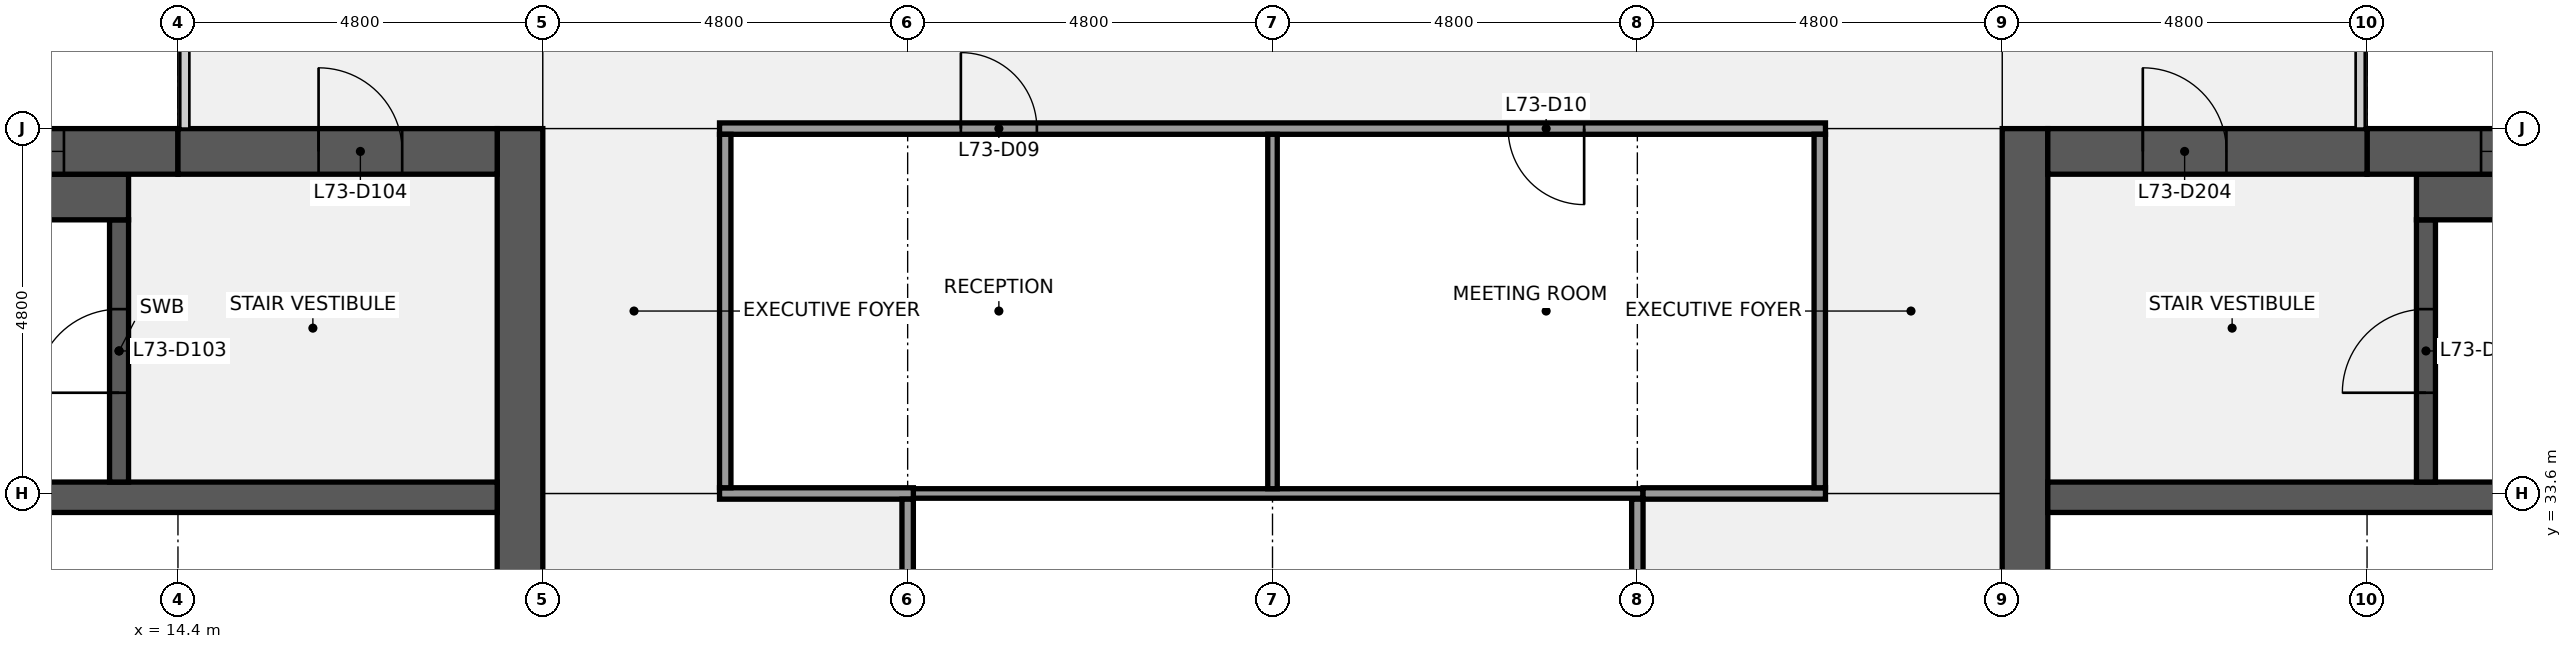
"""IFC4 building model, lengths in metres.
Left out: names, types, materials, properties, quantities, classifications, styles, units other than length and angle.
Written with IfcOpenShell. Run it as: python <this file> out.ifc"""

import sys

from ifc_helpers import new_model, si_unit, direction, frame, frame_2d, origin, place, context, subcontext, project, spatial, rectangle, extrude, element, fill, save


model = new_model("IFC4")
c1 = context("Model", 3, precision=1e-05, world=origin(), true_north=direction((0.0, 1.0)))
c2 = subcontext(c1, "Body", "Model", "MODEL_VIEW")
j1 = project(units=[si_unit("LENGTHUNIT", "METRE"), si_unit("PLANEANGLEUNIT", "RADIAN")], contexts=[c1])
p1 = place(None, origin())
s1 = spatial("IfcSite", under=j1, at=p1, CompositionType="ELEMENT")
p2 = place(p1, origin())
s2 = spatial("IfcBuilding", under=s1, at=p2, CompositionType="ELEMENT")
p3 = place(p2, frame((0.0, 0.0, 330.3)))
s3 = spatial("IfcBuildingStorey", under=s2, at=p3, CompositionType="ELEMENT", Elevation=330.3)
p4 = place(p3, frame((18.9, 38.4, 0.0), z_axis=(0.0, 0.0, 1.0), x_axis=(0.0, -1.0, 0.0)))
e1 = element("IfcWall", 1, at=p4, inside=s3, PredefinedType="SHEAR", context=c2, shape_type="SweptSolid", body=[
    extrude(rectangle(XDim=28.8, YDim=0.6, at=frame_2d((14.4, 0.0))), origin(), (0.0, 0.0, 1.0), 3.84),
])
p5 = place(p4, frame((18.3, 0.0, 0.0)))
e2 = element("IfcOpeningElement", 2, at=p5, cuts=e1, PredefinedType="OPENING", context=c2, shape_type="SweptSolid", body=[
    extrude(rectangle(XDim=1.8, YDim=2.1, at=frame_2d((0.9, 1.05))), frame((0.0, 0.31, 0.0), z_axis=(0.0, -1.0, 0.0), x_axis=(1.0, 0.0, 0.0)), (0.0, 0.0, 1.0), 0.62),
])
p6 = place(p4, frame((8.7, 0.0, 0.0)))
e3 = element("IfcOpeningElement", 3, at=p6, cuts=e1, PredefinedType="OPENING", context=c2, shape_type="SweptSolid", body=[
    extrude(rectangle(XDim=1.8, YDim=2.1, at=frame_2d((0.9, 1.05))), frame((0.0, 0.31, 0.0), z_axis=(0.0, -1.0, 0.0), x_axis=(1.0, 0.0, 0.0)), (0.0, 0.0, 1.0), 0.62),
])
p7 = place(p3, frame((0.6, 33.55, 0.0), z_axis=(0.0, 0.0, 1.0), x_axis=(1.0, 0.0, 0.0)))
e4 = element("IfcWall", 4, at=p7, inside=s3, PredefinedType="SHEAR", context=c2, shape_type="SweptSolid", body=[
    extrude(rectangle(XDim=18.0, YDim=0.4, at=frame_2d((9.0, 0.0))), origin(), (0.0, 0.0, 1.0), 3.84),
])
p8 = place(p3, frame((13.625, 33.75, 0.0), z_axis=(0.0, 0.0, 1.0), x_axis=(0.0, 1.0, 0.0)))
e5 = element("IfcWall", 5, at=p8, inside=s3, PredefinedType="SHEAR", context=c2, shape_type="SweptSolid", body=[
    extrude(rectangle(XDim=3.45, YDim=0.25, at=frame_2d((1.725, 0.0))), origin(), (0.0, 0.0, 1.0), 3.84),
])
p9 = place(p8, frame((1.175, 0.0, 0.0)))
e6 = element("IfcOpeningElement", 6, at=p9, cuts=e5, PredefinedType="OPENING", context=c2, shape_type="SweptSolid", body=[
    extrude(rectangle(XDim=1.1, YDim=2.1, at=frame_2d((0.55, 1.05))), frame((0.0, 0.135, 0.0), z_axis=(0.0, -1.0, 0.0), x_axis=(1.0, 0.0, 0.0)), (0.0, 0.0, 1.0), 0.27),
])
p10 = place(p3, frame((6.25, 37.5, 0.0), z_axis=(0.0, 0.0, 1.0), x_axis=(1.0, 0.0, 0.0)))
e7 = element("IfcWall", 7, at=p10, inside=s3, PredefinedType="SHEAR", context=c2, shape_type="SweptSolid", body=[
    extrude(rectangle(XDim=7.5, YDim=0.6, at=frame_2d((3.75, 0.0))), origin(), (0.0, 0.0, 1.0), 3.84),
])
p11 = place(p3, frame((0.6, 38.1, 0.0), z_axis=(0.0, 0.0, 1.0), x_axis=(1.0, 0.0, 0.0)))
e8 = element("IfcWall", 8, at=p11, inside=s3, PredefinedType="SHEAR", context=c2, shape_type="SweptSolid", body=[
    extrude(rectangle(XDim=13.8, YDim=0.6, at=frame_2d((6.9, 0.0))), origin(), (0.0, 0.0, 1.0), 3.84),
])
p12 = place(p11, frame((5.7, 0.0, 0.9)))
e9 = element("IfcOpeningElement", 9, at=p12, cuts=e8, PredefinedType="OPENING", context=c2, shape_type="SweptSolid", body=[
    extrude(rectangle(XDim=1.8, YDim=1.5, at=frame_2d((0.9, 0.75))), frame((0.0, 0.31, 0.0), z_axis=(0.0, -1.0, 0.0), x_axis=(1.0, 0.0, 0.0)), (0.0, 0.0, 1.0), 0.62),
])
p13 = place(p11, frame((10.5, 0.0, 0.9)))
e10 = element("IfcOpeningElement", 10, at=p13, cuts=e8, PredefinedType="OPENING", context=c2, shape_type="SweptSolid", body=[
    extrude(rectangle(XDim=1.8, YDim=1.5, at=frame_2d((0.9, 0.75))), frame((0.0, 0.31, 0.0), z_axis=(0.0, -1.0, 0.0), x_axis=(1.0, 0.0, 0.0)), (0.0, 0.0, 1.0), 0.62),
])
p14 = place(p3, frame((14.4, 38.1, 0.0), z_axis=(0.0, 0.0, 1.0), x_axis=(1.0, 0.0, 0.0)))
e11 = element("IfcWall", 11, at=p14, inside=s3, PredefinedType="SHEAR", context=c2, shape_type="SweptSolid", body=[
    extrude(rectangle(XDim=4.2, YDim=0.6, at=frame_2d((2.1, 0.0))), origin(), (0.0, 0.0, 1.0), 3.84),
])
p15 = place(p14, frame((1.85, 0.0, 0.0)))
e12 = element("IfcOpeningElement", 12, at=p15, cuts=e11, PredefinedType="OPENING", context=c2, shape_type="SweptSolid", body=[
    extrude(rectangle(XDim=1.1, YDim=2.1, at=frame_2d((0.55, 1.05))), frame((0.0, 0.31, 0.0), z_axis=(0.0, -1.0, 0.0), x_axis=(1.0, 0.0, 0.0)), (0.0, 0.0, 1.0), 0.62),
])
p16 = place(p3, frame((38.7, 9.6, 0.0), z_axis=(0.0, 0.0, 1.0), x_axis=(0.0, 1.0, 0.0)))
e13 = element("IfcWall", 13, at=p16, inside=s3, PredefinedType="SHEAR", context=c2, shape_type="SweptSolid", body=[
    extrude(rectangle(XDim=28.8, YDim=0.6, at=frame_2d((14.4, 0.0))), origin(), (0.0, 0.0, 1.0), 3.84),
])
p17 = place(p16, frame((8.7, 0.0, 0.0)))
e14 = element("IfcOpeningElement", 14, at=p17, cuts=e13, PredefinedType="OPENING", context=c2, shape_type="SweptSolid", body=[
    extrude(rectangle(XDim=1.8, YDim=2.1, at=frame_2d((0.9, 1.05))), frame((0.0, 0.31, 0.0), z_axis=(0.0, -1.0, 0.0), x_axis=(1.0, 0.0, 0.0)), (0.0, 0.0, 1.0), 0.62),
])
p18 = place(p16, frame((18.3, 0.0, 0.0)))
e15 = element("IfcOpeningElement", 15, at=p18, cuts=e13, PredefinedType="OPENING", context=c2, shape_type="SweptSolid", body=[
    extrude(rectangle(XDim=1.8, YDim=2.1, at=frame_2d((0.9, 1.05))), frame((0.0, 0.31, 0.0), z_axis=(0.0, -1.0, 0.0), x_axis=(1.0, 0.0, 0.0)), (0.0, 0.0, 1.0), 0.62),
])
p19 = place(p3, frame((39.0, 33.55, 0.0), z_axis=(0.0, 0.0, 1.0), x_axis=(1.0, 0.0, 0.0)))
e16 = element("IfcWall", 16, at=p19, inside=s3, PredefinedType="SHEAR", context=c2, shape_type="SweptSolid", body=[
    extrude(rectangle(XDim=18.0, YDim=0.4, at=frame_2d((9.0, 0.0))), origin(), (0.0, 0.0, 1.0), 3.84),
])
p20 = place(p3, frame((43.975, 33.75, 0.0), z_axis=(0.0, 0.0, 1.0), x_axis=(0.0, 1.0, 0.0)))
e17 = element("IfcWall", 17, at=p20, inside=s3, PredefinedType="SHEAR", context=c2, shape_type="SweptSolid", body=[
    extrude(rectangle(XDim=3.45, YDim=0.25, at=frame_2d((1.725, 0.0))), origin(), (0.0, 0.0, 1.0), 3.84),
])
p21 = place(p20, frame((1.175, 0.0, 0.0)))
e18 = element("IfcOpeningElement", 18, at=p21, cuts=e17, PredefinedType="OPENING", context=c2, shape_type="SweptSolid", body=[
    extrude(rectangle(XDim=1.1, YDim=2.1, at=frame_2d((0.55, 1.05))), frame((0.0, 0.135, 0.0), z_axis=(0.0, -1.0, 0.0), x_axis=(1.0, 0.0, 0.0)), (0.0, 0.0, 1.0), 0.27),
])
p22 = place(p3, frame((43.85, 37.5, 0.0), z_axis=(0.0, 0.0, 1.0), x_axis=(1.0, 0.0, 0.0)))
e19 = element("IfcWall", 19, at=p22, inside=s3, PredefinedType="SHEAR", context=c2, shape_type="SweptSolid", body=[
    extrude(rectangle(XDim=7.5, YDim=0.6, at=frame_2d((3.75, 0.0))), origin(), (0.0, 0.0, 1.0), 3.84),
])
p23 = place(p3, frame((43.2, 38.1, 0.0), z_axis=(0.0, 0.0, 1.0), x_axis=(1.0, 0.0, 0.0)))
e20 = element("IfcWall", 20, at=p23, inside=s3, PredefinedType="SHEAR", context=c2, shape_type="SweptSolid", body=[
    extrude(rectangle(XDim=13.8, YDim=0.6, at=frame_2d((6.9, 0.0))), origin(), (0.0, 0.0, 1.0), 3.84),
])
p24 = place(p23, frame((6.3, 0.0, 0.9)))
e21 = element("IfcOpeningElement", 21, at=p24, cuts=e20, PredefinedType="OPENING", context=c2, shape_type="SweptSolid", body=[
    extrude(rectangle(XDim=1.8, YDim=1.5, at=frame_2d((0.9, 0.75))), frame((0.0, 0.31, 0.0), z_axis=(0.0, -1.0, 0.0), x_axis=(1.0, 0.0, 0.0)), (0.0, 0.0, 1.0), 0.62),
])
p25 = place(p23, frame((1.5, 0.0, 0.9)))
e22 = element("IfcOpeningElement", 22, at=p25, cuts=e20, PredefinedType="OPENING", context=c2, shape_type="SweptSolid", body=[
    extrude(rectangle(XDim=1.8, YDim=1.5, at=frame_2d((0.9, 0.75))), frame((0.0, 0.31, 0.0), z_axis=(0.0, -1.0, 0.0), x_axis=(1.0, 0.0, 0.0)), (0.0, 0.0, 1.0), 0.62),
])
p26 = place(p3, frame((39.0, 38.1, 0.0), z_axis=(0.0, 0.0, 1.0), x_axis=(1.0, 0.0, 0.0)))
e23 = element("IfcWall", 23, at=p26, inside=s3, PredefinedType="SHEAR", context=c2, shape_type="SweptSolid", body=[
    extrude(rectangle(XDim=4.2, YDim=0.6, at=frame_2d((2.1, 0.0))), origin(), (0.0, 0.0, 1.0), 3.84),
])
p27 = place(p26, frame((1.25, 0.0, 0.0)))
e24 = element("IfcOpeningElement", 24, at=p27, cuts=e23, PredefinedType="OPENING", context=c2, shape_type="SweptSolid", body=[
    extrude(rectangle(XDim=1.1, YDim=2.1, at=frame_2d((0.55, 1.05))), frame((0.0, 0.31, 0.0), z_axis=(0.0, -1.0, 0.0), x_axis=(1.0, 0.0, 0.0)), (0.0, 0.0, 1.0), 0.62),
])
p28 = place(p3, frame((24.075, 33.6, 0.0), z_axis=(0.0, 0.0, 1.0), x_axis=(1.0, 0.0, 0.0)))
e25 = element("IfcWall", 25, at=p28, inside=s3, PredefinedType="PARTITIONING", context=c2, shape_type="SweptSolid", body=[
    extrude(rectangle(XDim=9.6, YDim=0.125, at=frame_2d((4.8, 0.0))), origin(), (0.0, 0.0, 1.0), 2.87),
])
p29 = place(p3, frame((21.525, 33.6, 0.0), z_axis=(0.0, 0.0, 1.0), x_axis=(1.0, 0.0, 0.0)))
e26 = element("IfcWall", 26, at=p29, inside=s3, PredefinedType="PARTITIONING", context=c2, shape_type="SweptSolid", body=[
    extrude(rectangle(XDim=2.55, YDim=0.15, at=frame_2d((1.275, 0.0))), origin(), (0.0, 0.0, 1.0), 2.87),
])
p30 = place(p3, frame((33.675, 33.6, 0.0), z_axis=(0.0, 0.0, 1.0), x_axis=(1.0, 0.0, 0.0)))
e27 = element("IfcWall", 27, at=p30, inside=s3, PredefinedType="PARTITIONING", context=c2, shape_type="SweptSolid", body=[
    extrude(rectangle(XDim=2.4, YDim=0.15, at=frame_2d((1.2, 0.0))), origin(), (0.0, 0.0, 1.0), 2.87),
])
p31 = place(p3, frame((21.525, 38.4, 0.0), z_axis=(0.0, 0.0, 1.0), x_axis=(1.0, 0.0, 0.0)))
e28 = element("IfcWall", 28, at=p31, inside=s3, PredefinedType="PARTITIONING", context=c2, shape_type="SweptSolid", body=[
    extrude(rectangle(XDim=14.55, YDim=0.15, at=frame_2d((7.275, 0.0))), origin(), (0.0, 0.0, 1.0), 2.87),
])
p32 = place(p31, frame((3.175, 0.0, 0.0)))
e29 = element("IfcOpeningElement", 29, at=p32, cuts=e28, PredefinedType="OPENING", context=c2, shape_type="SweptSolid", body=[
    extrude(rectangle(XDim=1.0, YDim=2.1, at=frame_2d((0.5, 1.05))), frame((0.0, 0.085, 0.0), z_axis=(0.0, -1.0, 0.0), x_axis=(1.0, 0.0, 0.0)), (0.0, 0.0, 1.0), 0.17),
])
p33 = place(p31, frame((10.375, 0.0, 0.0)))
e30 = element("IfcOpeningElement", 30, at=p33, cuts=e28, PredefinedType="OPENING", context=c2, shape_type="SweptSolid", body=[
    extrude(rectangle(XDim=1.0, YDim=2.1, at=frame_2d((0.5, 1.05))), frame((0.0, 0.085, 0.0), z_axis=(0.0, -1.0, 0.0), x_axis=(1.0, 0.0, 0.0)), (0.0, 0.0, 1.0), 0.17),
])
p34 = place(p3, frame((21.6, 33.675, 0.0), z_axis=(0.0, 0.0, 1.0), x_axis=(0.0, 1.0, 0.0)))
e31 = element("IfcWall", 31, at=p34, inside=s3, PredefinedType="PARTITIONING", context=c2, shape_type="SweptSolid", body=[
    extrude(rectangle(XDim=4.65, YDim=0.15, at=frame_2d((2.325, 0.0))), origin(), (0.0, 0.0, 1.0), 2.87),
])
p35 = place(p3, frame((24.0, 20.475, 0.0), z_axis=(0.0, 0.0, 1.0), x_axis=(0.0, 1.0, 0.0)))
e32 = element("IfcWall", 32, at=p35, inside=s3, PredefinedType="PARTITIONING", context=c2, shape_type="SweptSolid", body=[
    extrude(rectangle(XDim=13.05, YDim=0.15, at=frame_2d((6.525, 0.0))), origin(), (0.0, 0.0, 1.0), 2.87),
])
p36 = place(p35, frame((6.025, 0.0, 0.0)))
e33 = element("IfcOpeningElement", 33, at=p36, cuts=e32, PredefinedType="OPENING", context=c2, shape_type="SweptSolid", body=[
    extrude(rectangle(XDim=1.0, YDim=2.1, at=frame_2d((0.5, 1.05))), frame((0.0, 0.085, 0.0), z_axis=(0.0, -1.0, 0.0), x_axis=(1.0, 0.0, 0.0)), (0.0, 0.0, 1.0), 0.17),
])
p37 = place(p3, frame((28.8, 33.663, 0.0), z_axis=(0.0, 0.0, 1.0), x_axis=(0.0, 1.0, 0.0)))
e34 = element("IfcWall", 34, at=p37, inside=s3, PredefinedType="PARTITIONING", context=c2, shape_type="SweptSolid", body=[
    extrude(rectangle(XDim=4.662, YDim=0.125, at=frame_2d((2.331, 0.0))), origin(), (0.0, 0.0, 1.0), 2.87),
])
p38 = place(p3, frame((33.6, 20.475, 0.0), z_axis=(0.0, 0.0, 1.0), x_axis=(0.0, 1.0, 0.0)))
e35 = element("IfcWall", 35, at=p38, inside=s3, PredefinedType="PARTITIONING", context=c2, shape_type="SweptSolid", body=[
    extrude(rectangle(XDim=13.05, YDim=0.15, at=frame_2d((6.525, 0.0))), origin(), (0.0, 0.0, 1.0), 2.87),
])
p39 = place(p3, frame((36.0, 33.675, 0.0), z_axis=(0.0, 0.0, 1.0), x_axis=(0.0, 1.0, 0.0)))
e36 = element("IfcWall", 36, at=p39, inside=s3, PredefinedType="PARTITIONING", context=c2, shape_type="SweptSolid", body=[
    extrude(rectangle(XDim=4.65, YDim=0.15, at=frame_2d((2.325, 0.0))), origin(), (0.0, 0.0, 1.0), 2.87),
])
p40 = place(p9, origin())
e37 = element("IfcDoor", 37, at=p40, inside=s3, OperationType="SINGLE_SWING_LEFT", PredefinedType="DOOR", context=c2, shape_type="SweptSolid", body=[
    extrude(rectangle(XDim=1.1, YDim=2.1, at=frame_2d((0.55, 1.05))), frame((0.0, 0.025, 0.0), z_axis=(0.0, -1.0, 0.0), x_axis=(1.0, 0.0, 0.0)), (0.0, 0.0, 1.0), 0.05),
])
fill(e6, e37)
p41 = place(p15, origin())
e38 = element("IfcDoor", 38, at=p41, inside=s3, OperationType="SINGLE_SWING_LEFT", PredefinedType="DOOR", context=c2, shape_type="SweptSolid", body=[
    extrude(rectangle(XDim=1.1, YDim=2.1, at=frame_2d((0.55, 1.05))), frame((0.0, 0.025, 0.0), z_axis=(0.0, -1.0, 0.0), x_axis=(1.0, 0.0, 0.0)), (0.0, 0.0, 1.0), 0.05),
])
fill(e12, e38)
p42 = place(p13, origin())
e39 = element("IfcWindow", 39, at=p42, inside=s3, PartitioningType="SINGLE_PANEL", PredefinedType="WINDOW", context=c2, shape_type="SweptSolid", body=[
    extrude(rectangle(XDim=1.8, YDim=1.5, at=frame_2d((0.9, 0.75))), frame((0.0, 0.03, 0.0), z_axis=(0.0, -1.0, 0.0), x_axis=(1.0, 0.0, 0.0)), (0.0, 0.0, 1.0), 0.06),
])
fill(e10, e39)
p43 = place(p21, origin())
e40 = element("IfcDoor", 40, at=p43, inside=s3, OperationType="SINGLE_SWING_LEFT", PredefinedType="DOOR", context=c2, shape_type="SweptSolid", body=[
    extrude(rectangle(XDim=1.1, YDim=2.1, at=frame_2d((0.55, 1.05))), frame((0.0, 0.025, 0.0), z_axis=(0.0, -1.0, 0.0), x_axis=(1.0, 0.0, 0.0)), (0.0, 0.0, 1.0), 0.05),
])
fill(e18, e40)
p44 = place(p27, origin())
e41 = element("IfcDoor", 41, at=p44, inside=s3, OperationType="SINGLE_SWING_LEFT", PredefinedType="DOOR", context=c2, shape_type="SweptSolid", body=[
    extrude(rectangle(XDim=1.1, YDim=2.1, at=frame_2d((0.55, 1.05))), frame((0.0, 0.025, 0.0), z_axis=(0.0, -1.0, 0.0), x_axis=(1.0, 0.0, 0.0)), (0.0, 0.0, 1.0), 0.05),
])
fill(e24, e41)
p45 = place(p25, origin())
e42 = element("IfcWindow", 42, at=p45, inside=s3, PartitioningType="SINGLE_PANEL", PredefinedType="WINDOW", context=c2, shape_type="SweptSolid", body=[
    extrude(rectangle(XDim=1.8, YDim=1.5, at=frame_2d((0.9, 0.75))), frame((0.0, 0.03, 0.0), z_axis=(0.0, -1.0, 0.0), x_axis=(1.0, 0.0, 0.0)), (0.0, 0.0, 1.0), 0.06),
])
fill(e22, e42)
p46 = place(p32, origin())
e43 = element("IfcDoor", 43, at=p46, inside=s3, OperationType="SINGLE_SWING_LEFT", PredefinedType="DOOR", context=c2, shape_type="SweptSolid", body=[
    extrude(rectangle(XDim=1.0, YDim=2.1, at=frame_2d((0.5, 1.05))), frame((0.0, 0.025, 0.0), z_axis=(0.0, -1.0, 0.0), x_axis=(1.0, 0.0, 0.0)), (0.0, 0.0, 1.0), 0.05),
])
fill(e29, e43)
p47 = place(p33, origin())
e44 = element("IfcDoor", 44, at=p47, inside=s3, OperationType="SINGLE_SWING_RIGHT", PredefinedType="DOOR", context=c2, shape_type="SweptSolid", body=[
    extrude(rectangle(XDim=1.0, YDim=2.1, at=frame_2d((0.5, 1.05))), frame((0.0, 0.025, 0.0), z_axis=(0.0, -1.0, 0.0), x_axis=(1.0, 0.0, 0.0)), (0.0, 0.0, 1.0), 0.05),
])
fill(e30, e44)
save(model, sys.argv[1])
